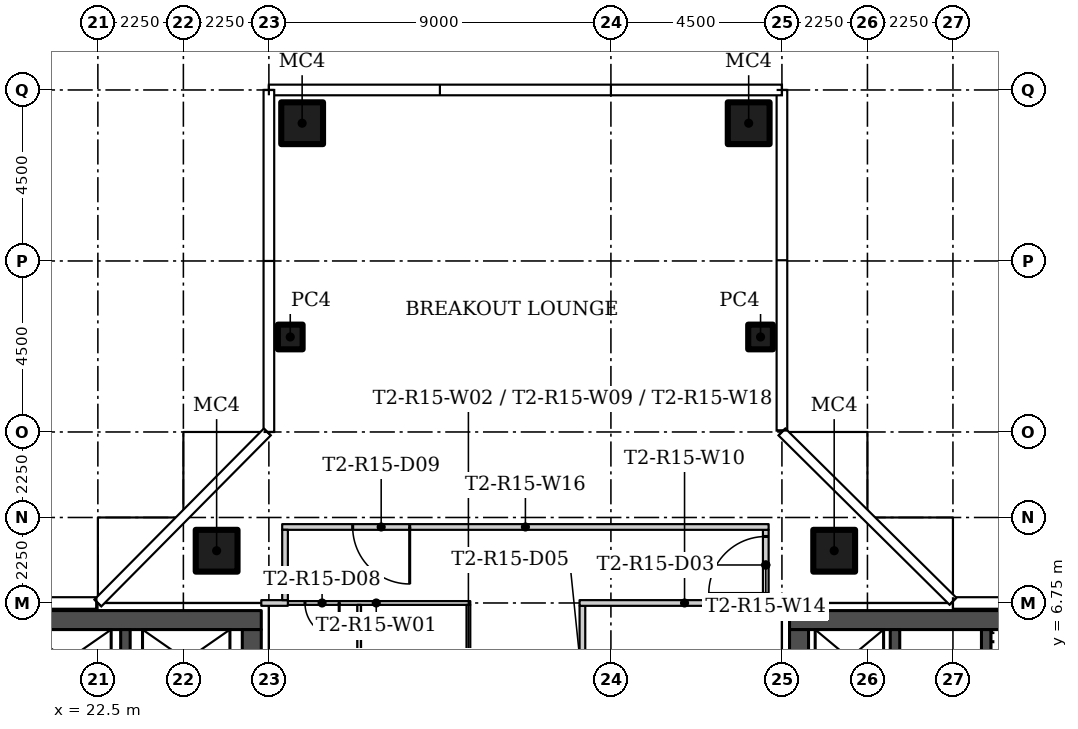
"""IFC4 building model, lengths in metres.
Left out: names, types, materials, properties, quantities, classifications, styles, units other than length and angle.
Written with IfcOpenShell. Run it as: python <this file> out.ifc"""

import sys

from ifc_helpers import new_model, si_unit, direction, frame, frame_2d, origin, origin_2d, place, context, subcontext, project, spatial, rectangle, hollow_rectangle, extrude, element, fill, save


model = new_model("IFC4")
c1 = context("Model", 3, precision=1e-05, world=origin(), true_north=direction((0.0, 1.0)))
c2 = subcontext(c1, "Body", "Model", "MODEL_VIEW")
j1 = project(units=[si_unit("LENGTHUNIT", "METRE"), si_unit("PLANEANGLEUNIT", "RADIAN")], contexts=[c1])
p1 = place(None, origin())
s1 = spatial("IfcSite", under=j1, at=p1, CompositionType="ELEMENT")
p2 = place(p1, origin())
s2 = spatial("IfcBuilding", under=s1, at=p2, CompositionType="ELEMENT")
p3 = place(p2, frame((0.0, 0.0, 142.8)))
s3 = spatial("IfcBuildingStorey", under=s2, at=p3, CompositionType="ELEMENT", Elevation=142.8)
for number, where in (
    (1, (25.625, 8.125, 0.0)),
    (2, (41.875, 8.125, 0.0)),
):
    element("IfcColumn", number, at=place(p3, frame(where)), inside=s3, PredefinedType="COLUMN", context=c2, shape_type="SweptSolid", body=[
        extrude(hollow_rectangle(XDim=1.1, YDim=1.1, WallThickness=0.04, at=origin_2d()), origin(), (0.0, 0.0, 1.0), 3.55),
    ])
p4 = place(p3, frame((39.938, 13.75, 0.0)))
e3 = element("IfcColumn", 3, at=p4, inside=s3, PredefinedType="COLUMN", context=c2, shape_type="SweptSolid", body=[
    extrude(hollow_rectangle(XDim=0.65, YDim=0.65, WallThickness=0.02, at=origin_2d()), origin(), (0.0, 0.0, 1.0), 3.55),
])
p5 = place(p3, frame((39.625, 19.375, 0.0)))
e4 = element("IfcColumn", 4, at=p5, inside=s3, PredefinedType="COLUMN", context=c2, shape_type="SweptSolid", body=[
    extrude(hollow_rectangle(XDim=1.1, YDim=1.1, WallThickness=0.04, at=origin_2d()), origin(), (0.0, 0.0, 1.0), 3.55),
])
p6 = place(p3, frame((27.562, 13.75, 0.0)))
e5 = element("IfcColumn", 5, at=p6, inside=s3, PredefinedType="COLUMN", context=c2, shape_type="SweptSolid", body=[
    extrude(hollow_rectangle(XDim=0.65, YDim=0.65, WallThickness=0.02, at=origin_2d()), origin(), (0.0, 0.0, 1.0), 3.55),
])
p7 = place(p3, frame((27.875, 19.375, 0.0)))
e6 = element("IfcColumn", 6, at=p7, inside=s3, PredefinedType="COLUMN", context=c2, shape_type="SweptSolid", body=[
    extrude(hollow_rectangle(XDim=1.1, YDim=1.1, WallThickness=0.04, at=origin_2d()), origin(), (0.0, 0.0, 1.0), 3.55),
])
p8 = place(p3, frame((32.3, 6.75, 0.0), z_axis=(0.0, 0.0, 1.0), x_axis=(-1.0, 0.0, 0.0)))
e7 = element("IfcWall", 7, at=p8, inside=s3, PredefinedType="PARTITIONING", context=c2, shape_type="SweptSolid", body=[
    extrude(rectangle(XDim=4.95, YDim=0.1, at=frame_2d((2.475, 0.0))), origin(), (0.0, 0.0, 1.0), 3.55),
])
p9 = place(p8, frame((3.45, 0.0, 0.0)))
e8 = element("IfcOpeningElement", 8, at=p9, cuts=e7, PredefinedType="OPENING", context=c2, shape_type="SweptSolid", body=[
    extrude(rectangle(XDim=0.9, YDim=2.1, at=frame_2d((0.45, 1.05))), frame((0.0, 0.06, 0.0), z_axis=(0.0, -1.0, 0.0), x_axis=(1.0, 0.0, 0.0)), (0.0, 0.0, 1.0), 0.12),
])
p10 = place(p3, frame((32.25, 2.5, 0.0), z_axis=(0.0, 0.0, 1.0), x_axis=(0.0, 1.0, 0.0)))
e9 = element("IfcWall", 9, at=p10, inside=s3, PredefinedType="PARTITIONING", context=c2, shape_type="SweptSolid", body=[
    extrude(rectangle(XDim=4.2, YDim=0.1, at=frame_2d((2.1, 0.0))), origin(), (0.0, 0.0, 1.0), 3.55),
])
p11 = place(p10, frame((1.65, 0.0, 0.0)))
e10 = element("IfcOpeningElement", 10, at=p11, cuts=e9, PredefinedType="OPENING", context=c2, shape_type="SweptSolid", body=[
    extrude(rectangle(XDim=0.9, YDim=2.1, at=frame_2d((0.45, 1.05))), frame((0.0, 0.06, 0.0), z_axis=(0.0, -1.0, 0.0), x_axis=(1.0, 0.0, 0.0)), (0.0, 0.0, 1.0), 0.12),
])
p12 = place(p3, frame((35.25, 6.675, 0.0), z_axis=(0.0, 0.0, 1.0), x_axis=(0.0, -1.0, 0.0)))
e11 = element("IfcWall", 11, at=p12, inside=s3, PredefinedType="PARTITIONING", context=c2, shape_type="SweptSolid", body=[
    extrude(rectangle(XDim=4.15, YDim=0.15, at=frame_2d((2.075, 0.0))), origin(), (0.0, 0.0, 1.0), 3.55),
])
p13 = place(p12, frame((1.625, 0.0, 0.0)))
e12 = element("IfcOpeningElement", 12, at=p13, cuts=e11, PredefinedType="OPENING", context=c2, shape_type="SweptSolid", body=[
    extrude(rectangle(XDim=0.9, YDim=2.1, at=frame_2d((0.45, 1.05))), frame((0.0, 0.085, 0.0), z_axis=(0.0, -1.0, 0.0), x_axis=(1.0, 0.0, 0.0)), (0.0, 0.0, 1.0), 0.17),
])
p14 = place(p3, frame((27.5, 6.75, 0.0), z_axis=(0.0, 0.0, 1.0), x_axis=(-1.0, 0.0, 0.0)))
e13 = element("IfcWall", 13, at=p14, inside=s3, PredefinedType="PARTITIONING", context=c2, shape_type="SweptSolid", body=[
    extrude(rectangle(XDim=0.7, YDim=0.15, at=frame_2d((0.35, 0.0))), origin(), (0.0, 0.0, 1.0), 3.55),
])
p15 = place(p3, frame((40.7, 6.75, 0.0), z_axis=(0.0, 0.0, 1.0), x_axis=(-1.0, 0.0, 0.0)))
e14 = element("IfcWall", 14, at=p15, inside=s3, PredefinedType="PARTITIONING", context=c2, shape_type="SweptSolid", body=[
    extrude(rectangle(XDim=5.525, YDim=0.15, at=frame_2d((2.762, 0.0))), origin(), (0.0, 0.0, 1.0), 3.55),
])
p16 = place(p3, frame((40.075, 6.825, 0.0), z_axis=(0.0, 0.0, 1.0), x_axis=(0.0, 1.0, 0.0)))
e15 = element("IfcWall", 15, at=p16, inside=s3, PredefinedType="PARTITIONING", context=c2, shape_type="SweptSolid", body=[
    extrude(rectangle(XDim=1.85, YDim=0.15, at=frame_2d((0.925, 0.0))), origin(), (0.0, 0.0, 1.0), 3.55),
])
p17 = place(p16, frame((0.175, 0.0, 0.0)))
e16 = element("IfcOpeningElement", 16, at=p17, cuts=e15, PredefinedType="OPENING", context=c2, shape_type="SweptSolid", body=[
    extrude(rectangle(XDim=1.5, YDim=2.1, at=frame_2d((0.75, 1.05))), frame((0.0, 0.085, 0.0), z_axis=(0.0, -1.0, 0.0), x_axis=(1.0, 0.0, 0.0)), (0.0, 0.0, 1.0), 0.17),
])
p18 = place(p3, frame((40.15, 8.75, 0.0), z_axis=(0.0, 0.0, 1.0), x_axis=(-1.0, 0.0, 0.0)))
e17 = element("IfcWall", 17, at=p18, inside=s3, PredefinedType="PARTITIONING", context=c2, shape_type="SweptSolid", body=[
    extrude(rectangle(XDim=12.8, YDim=0.15, at=frame_2d((6.4, 0.0))), origin(), (0.0, 0.0, 1.0), 3.55),
])
p19 = place(p18, frame((9.445, 0.0, 0.0)))
e18 = element("IfcOpeningElement", 18, at=p19, cuts=e17, PredefinedType="OPENING", context=c2, shape_type="SweptSolid", body=[
    extrude(rectangle(XDim=1.5, YDim=2.1, at=frame_2d((0.75, 1.05))), frame((0.0, 0.085, 0.0), z_axis=(0.0, -1.0, 0.0), x_axis=(1.0, 0.0, 0.0)), (0.0, 0.0, 1.0), 0.17),
])
p20 = place(p3, frame((27.425, 8.675, 0.0), z_axis=(0.0, 0.0, 1.0), x_axis=(0.0, -1.0, 0.0)))
e19 = element("IfcWall", 19, at=p20, inside=s3, PredefinedType="PARTITIONING", context=c2, shape_type="SweptSolid", body=[
    extrude(rectangle(XDim=1.85, YDim=0.15, at=frame_2d((0.925, 0.0))), origin(), (0.0, 0.0, 1.0), 3.55),
])
p21 = place(p3, frame((29.375, 6.7, 0.0), z_axis=(0.0, 0.0, 1.0), x_axis=(0.0, -1.0, 0.0)))
e20 = element("IfcWall", 20, at=p21, inside=s3, PredefinedType="PARTITIONING", context=c2, shape_type="SweptSolid", body=[
    extrude(rectangle(XDim=4.2, YDim=0.1, at=frame_2d((2.1, 0.0))), origin(), (0.0, 0.0, 1.0), 3.55),
])
p22 = place(p3, frame((13.7, 6.3, 0.0)))
e21 = element("IfcWall", 21, at=p22, inside=s3, PredefinedType="SHEAR", context=c2, shape_type="SweptSolid", body=[
    extrude(rectangle(XDim=13.1, YDim=0.5, at=frame_2d((6.55, 0.0))), origin(), (0.0, 0.0, 1.0), 3.55),
])
p23 = place(p3, frame((26.55, 6.05, 0.0), z_axis=(0.0, 0.0, 1.0), x_axis=(0.0, -1.0, 0.0)))
e22 = element("IfcWall", 22, at=p23, inside=s3, PredefinedType="SHEAR", context=c2, shape_type="SweptSolid", body=[
    extrude(rectangle(XDim=12.1, YDim=0.5, at=frame_2d((6.05, 0.0))), origin(), (0.0, 0.0, 1.0), 3.55),
])
p24 = place(p23, frame((10.1, 0.0, 0.0)))
e23 = element("IfcOpeningElement", 23, at=p24, cuts=e22, PredefinedType="OPENING", context=c2, shape_type="SweptSolid", body=[
    extrude(rectangle(XDim=1.2, YDim=2.1, at=frame_2d((0.6, 1.05))), frame((0.0, 0.26, 0.0), z_axis=(0.0, -1.0, 0.0), x_axis=(1.0, 0.0, 0.0)), (0.0, 0.0, 1.0), 0.52),
])
p25 = place(p23, frame((3.9, 0.0, 0.0)))
e24 = element("IfcOpeningElement", 24, at=p25, cuts=e22, PredefinedType="OPENING", context=c2, shape_type="SweptSolid", body=[
    extrude(rectangle(XDim=1.8, YDim=2.4, at=frame_2d((0.9, 1.2))), frame((0.0, 0.26, 0.0), z_axis=(0.0, -1.0, 0.0), x_axis=(1.0, 0.0, 0.0)), (0.0, 0.0, 1.0), 0.52),
])
p26 = place(p3, frame((23.225, 3.25, 0.0), z_axis=(0.0, 0.0, 1.0), x_axis=(0.0, 1.0, 0.0)))
e25 = element("IfcWall", 25, at=p26, inside=s3, PredefinedType="SHEAR", context=c2, shape_type="SweptSolid", body=[
    extrude(rectangle(XDim=2.8, YDim=0.25, at=frame_2d((1.4, 0.0))), origin(), (0.0, 0.0, 1.0), 3.55),
])
p27 = place(p3, frame((53.8, 6.3, 0.0), z_axis=(0.0, 0.0, 1.0), x_axis=(-1.0, 0.0, 0.0)))
e26 = element("IfcWall", 26, at=p27, inside=s3, PredefinedType="SHEAR", context=c2, shape_type="SweptSolid", body=[
    extrude(rectangle(XDim=13.1, YDim=0.5, at=frame_2d((6.55, 0.0))), origin(), (0.0, 0.0, 1.0), 3.55),
])
p28 = place(p3, frame((40.95, -6.05, 0.0), z_axis=(0.0, 0.0, 1.0), x_axis=(0.0, 1.0, 0.0)))
e27 = element("IfcWall", 27, at=p28, inside=s3, PredefinedType="SHEAR", context=c2, shape_type="SweptSolid", body=[
    extrude(rectangle(XDim=12.1, YDim=0.5, at=frame_2d((6.05, 0.0))), origin(), (0.0, 0.0, 1.0), 3.55),
])
p29 = place(p28, frame((0.8, 0.0, 0.0)))
e28 = element("IfcOpeningElement", 28, at=p29, cuts=e27, PredefinedType="OPENING", context=c2, shape_type="SweptSolid", body=[
    extrude(rectangle(XDim=1.2, YDim=2.1, at=frame_2d((0.6, 1.05))), frame((0.0, 0.26, 0.0), z_axis=(0.0, -1.0, 0.0), x_axis=(1.0, 0.0, 0.0)), (0.0, 0.0, 1.0), 0.52),
])
p30 = place(p28, frame((6.4, 0.0, 0.0)))
e29 = element("IfcOpeningElement", 29, at=p30, cuts=e27, PredefinedType="OPENING", context=c2, shape_type="SweptSolid", body=[
    extrude(rectangle(XDim=1.8, YDim=2.4, at=frame_2d((0.9, 1.2))), frame((0.0, 0.26, 0.0), z_axis=(0.0, -1.0, 0.0), x_axis=(1.0, 0.0, 0.0)), (0.0, 0.0, 1.0), 0.52),
])
for number, where, z_axis, x_axis in (
    (30, (45.875, 3.25, 0.0), (0.0, 0.0, 1.0), (0.0, 1.0, 0.0)),
    (31, (43.475, 3.25, 0.0), (0.0, 0.0, 1.0), (0.0, 1.0, 0.0)),
):
    element("IfcWall", number, at=place(p3, frame(where, z_axis=z_axis, x_axis=x_axis)), inside=s3, PredefinedType="SHEAR", context=c2, shape_type="SweptSolid", body=[
        extrude(rectangle(XDim=2.8, YDim=0.25, at=frame_2d((1.4, 0.0))), origin(), (0.0, 0.0, 1.0), 3.55),
    ])
p31 = place(p17, origin())
e32 = element("IfcDoor", 32, at=p31, inside=s3, OperationType="DOUBLE_DOOR_SINGLE_SWING", PredefinedType="DOOR", context=c2, shape_type="SweptSolid", body=[
    extrude(rectangle(XDim=1.5, YDim=2.1, at=frame_2d((0.75, 1.05))), frame((0.0, 0.025, 0.0), z_axis=(0.0, -1.0, 0.0), x_axis=(1.0, 0.0, 0.0)), (0.0, 0.0, 1.0), 0.05),
])
fill(e16, e32)
p32 = place(p9, origin())
e33 = element("IfcDoor", 33, at=p32, inside=s3, OperationType="SINGLE_SWING_LEFT", PredefinedType="DOOR", context=c2, shape_type="SweptSolid", body=[
    extrude(rectangle(XDim=0.9, YDim=2.1, at=frame_2d((0.45, 1.05))), frame((0.0, 0.025, 0.0), z_axis=(0.0, -1.0, 0.0), x_axis=(1.0, 0.0, 0.0)), (0.0, 0.0, 1.0), 0.05),
])
fill(e8, e33)
p33 = place(p19, origin())
e34 = element("IfcDoor", 34, at=p33, inside=s3, OperationType="DOUBLE_DOOR_SINGLE_SWING", PredefinedType="DOOR", context=c2, shape_type="SweptSolid", body=[
    extrude(rectangle(XDim=1.5, YDim=2.1, at=frame_2d((0.75, 1.05))), frame((0.0, 0.025, 0.0), z_axis=(0.0, -1.0, 0.0), x_axis=(1.0, 0.0, 0.0)), (0.0, 0.0, 1.0), 0.05),
])
fill(e18, e34)
save(model, sys.argv[1])
